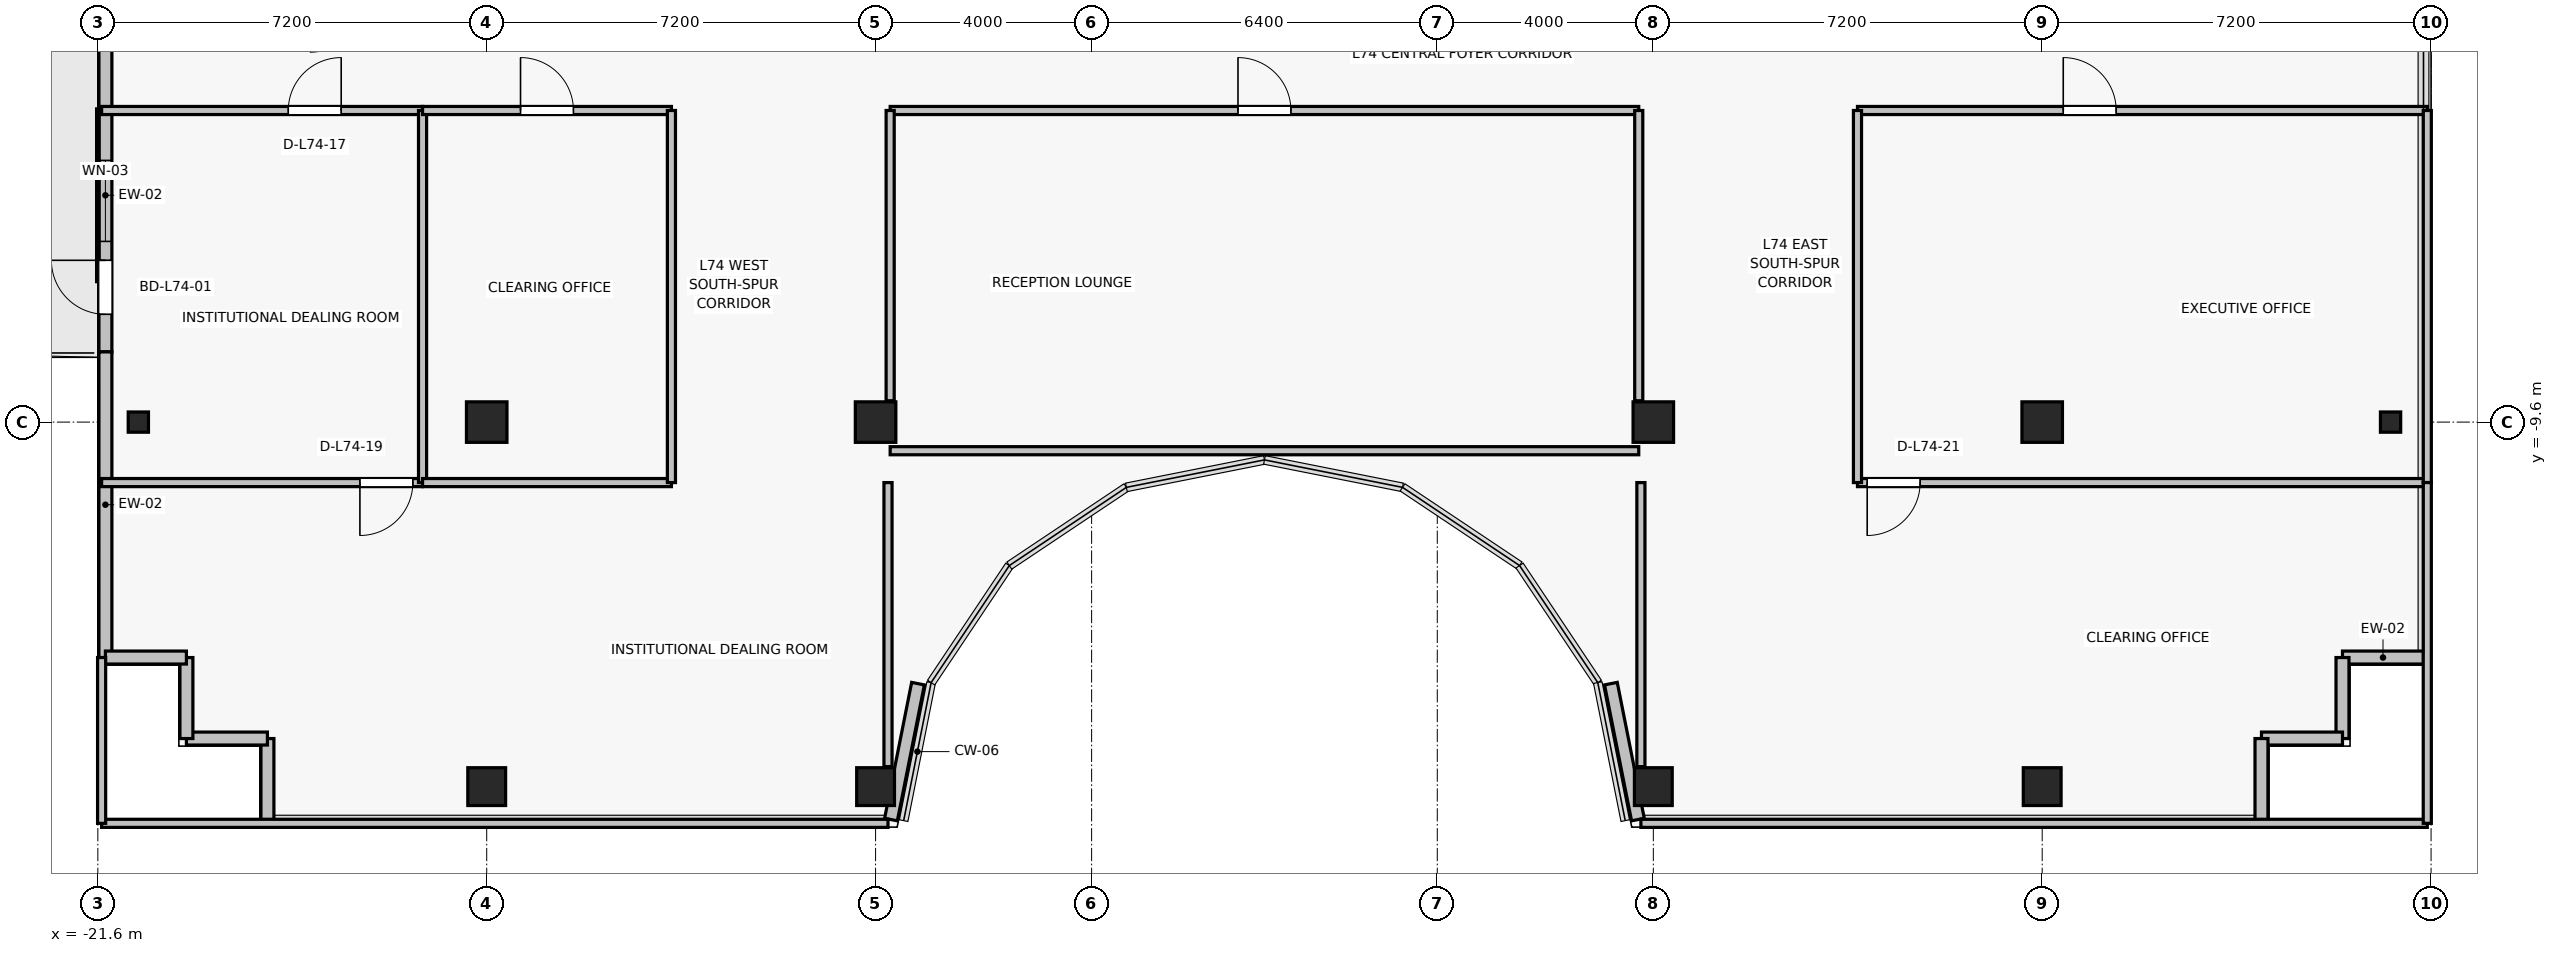
"""IFC4 building model, lengths in metres.
Left out: names, types, materials, properties, quantities, classifications, styles, units other than length and angle.
Written with IfcOpenShell. Run it as: python <this file> out.ifc"""

import sys

from ifc_helpers import new_model, si_unit, direction, frame, frame_2d, origin, origin_2d, place, context, subcontext, project, spatial, rectangle, i_section, extrude, source, transform, mapped, element, fill, save


model = new_model("IFC4")
c1 = context("Model", 3, precision=1e-05, world=origin(), true_north=direction((0.0, 1.0)))
c2 = subcontext(c1, "Body", "Model", "MODEL_VIEW")
j1 = project(units=[si_unit("LENGTHUNIT", "METRE"), si_unit("PLANEANGLEUNIT", "RADIAN")], contexts=[c1])
p1 = place(None, origin())
s1 = spatial("IfcSite", under=j1, at=p1, CompositionType="ELEMENT")
p2 = place(p1, origin())
s2 = spatial("IfcBuilding", under=s1, at=p2, CompositionType="ELEMENT")
p3 = place(p2, frame((0.0, 0.0, 261.7)))
s3 = spatial("IfcBuildingStorey", under=s2, at=p3, CompositionType="ELEMENT", Elevation=261.7)
for number, where, z_axis, x_axis in (
    (1, (-14.4, -9.6, 0.0), (0.0, 0.0, 1.0), (1.0, 0.0, 0.0)),
    (2, (-7.2, -9.6, 0.0), (0.0, 0.0, 1.0), (1.0, 0.0, 0.0)),
    (3, (7.2, -9.6, 0.0), (0.0, 0.0, 1.0), (1.0, 0.0, 0.0)),
    (4, (14.4, -9.6, 0.0), (0.0, 0.0, 1.0), (1.0, 0.0, 0.0)),
):
    element("IfcColumn", number, at=place(p3, frame(where, z_axis=z_axis, x_axis=x_axis)), inside=s3, PredefinedType="COLUMN", context=c2, shape_type="SweptSolid", body=[
        extrude(rectangle(XDim=0.75, YDim=0.75, at=origin_2d()), origin(), (0.0, 0.0, 1.0), 3.3),
    ])
for number, where, z_axis, x_axis in (
    (5, (-14.4, -16.35, 0.0), (0.0, 0.0, 1.0), (1.0, 0.0, 0.0)),
    (6, (-7.2, -16.35, 0.0), (0.0, 0.0, 1.0), (1.0, 0.0, 0.0)),
    (7, (7.2, -16.35, 0.0), (0.0, 0.0, 1.0), (1.0, 0.0, 0.0)),
    (8, (14.4, -16.35, 0.0), (0.0, 0.0, 1.0), (1.0, 0.0, 0.0)),
):
    element("IfcColumn", number, at=place(p3, frame(where, z_axis=z_axis, x_axis=x_axis)), inside=s3, PredefinedType="COLUMN", context=c2, shape_type="SweptSolid", body=[
        extrude(rectangle(XDim=0.7, YDim=0.7, at=origin_2d()), origin(), (0.0, 0.0, 1.0), 3.3),
    ])
for number, where, z_axis, x_axis in (
    (9, (-20.85, -9.6, 0.0), (0.0, 0.0, 1.0), (1.0, 0.0, 0.0)),
    (10, (20.85, -9.6, 0.0), (0.0, 0.0, 1.0), (1.0, 0.0, 0.0)),
):
    element("IfcColumn", number, at=place(p3, frame(where, z_axis=z_axis, x_axis=x_axis)), inside=s3, PredefinedType="COLUMN", context=c2, shape_type="SweptSolid", body=[
        extrude(i_section(OverallWidth=0.375, OverallDepth=0.375, WebThickness=0.017, FlangeThickness=0.027, FilletRadius=0.015, at=origin_2d()), origin(), (0.0, 0.0, 1.0), 3.3),
    ])
p4 = place(p3, frame((-21.46, -8.3, 0.0), z_axis=(0.0, 0.0, 1.0), x_axis=(0.0, 1.0, 0.0)))
e11 = element("IfcWall", 11, at=p4, inside=s3, PredefinedType="SOLIDWALL", context=c2, shape_type="SweptSolid", body=[
    extrude(rectangle(XDim=5.8, YDim=0.24, at=frame_2d((2.9, 0.0))), origin(), (0.0, 0.0, 1.0), 3.075),
])
p5 = place(p4, frame((0.696, 0.0, 0.0)))
e12 = element("IfcOpeningElement", 12, at=p5, cuts=e11, PredefinedType="OPENING", context=c2, shape_type="SweptSolid", body=[
    extrude(rectangle(XDim=1.0, YDim=2.2, at=frame_2d((0.5, 1.1))), frame((0.0, 0.13, 0.0), z_axis=(0.0, -1.0, 0.0), x_axis=(1.0, 0.0, 0.0)), (0.0, 0.0, 1.0), 0.26),
])
p6 = place(p4, frame((2.046, 0.0, 0.85)))
e13 = element("IfcOpeningElement", 13, at=p6, cuts=e11, PredefinedType="OPENING", context=c2, shape_type="SweptSolid", body=[
    extrude(rectangle(XDim=1.5, YDim=1.6, at=frame_2d((0.75, 0.8))), frame((0.0, 0.13, 0.0), z_axis=(0.0, -1.0, 0.0), x_axis=(1.0, 0.0, 0.0)), (0.0, 0.0, 1.0), 0.26),
])
p7 = place(p3, frame((-21.46, -8.3, 0.0), z_axis=(0.0, 0.0, 1.0), x_axis=(0.0, -1.0, 0.0)))
e14 = element("IfcWall", 14, at=p7, inside=s3, PredefinedType="SOLIDWALL", context=c2, shape_type="SweptSolid", body=[
    extrude(rectangle(XDim=5.66, YDim=0.24, at=frame_2d((2.83, 0.0))), origin(), (0.0, 0.0, 1.0), 3.075),
])
for number, where, z_axis, x_axis in (
    (15, (19.96, -13.96, 0.0), (0.0, 0.0, 1.0), (1.0, 0.0, 0.0)),
    (16, (19.96, -15.46, 0.0), (0.0, 0.0, 1.0), (0.0, 1.0, 0.0)),
    (17, (18.46, -15.46, 0.0), (0.0, 0.0, 1.0), (1.0, 0.0, 0.0)),
    (18, (18.46, -16.96, 0.0), (0.0, 0.0, 1.0), (0.0, 1.0, 0.0)),
):
    element("IfcWall", number, at=place(p3, frame(where, z_axis=z_axis, x_axis=x_axis)), inside=s3, PredefinedType="SOLIDWALL", context=c2, shape_type="SweptSolid", body=[
        extrude(rectangle(XDim=1.5, YDim=0.24, at=frame_2d((0.75, 0.0))), origin(), (0.0, 0.0, 1.0), 3.075),
    ])
for number, where, z_axis, x_axis in (
    (19, (6.414, -14.443, 0.0), (0.0, 0.0, 1.0), (0.195, -0.981, 0.0)),
    (20, (-6.915, -16.96, 0.0), (0.0, 0.0, 1.0), (0.195, 0.981, 0.0)),
):
    element("IfcWall", number, at=place(p3, frame(where, z_axis=z_axis, x_axis=x_axis)), inside=s3, PredefinedType="SOLIDWALL", context=c2, shape_type="SweptSolid", body=[
        extrude(rectangle(XDim=2.566, YDim=0.24, at=frame_2d((1.283, 0.0))), origin(), (0.0, 0.0, 1.0), 3.075),
    ])
for number, where, z_axis, x_axis in (
    (21, (-18.46, -15.46, 0.0), (0.0, 0.0, 1.0), (0.0, -1.0, 0.0)),
    (22, (-19.96, -15.46, 0.0), (0.0, 0.0, 1.0), (1.0, 0.0, 0.0)),
    (23, (-19.96, -13.96, 0.0), (0.0, 0.0, 1.0), (0.0, -1.0, 0.0)),
    (24, (-21.46, -13.96, 0.0), (0.0, 0.0, 1.0), (1.0, 0.0, 0.0)),
):
    element("IfcWall", number, at=place(p3, frame(where, z_axis=z_axis, x_axis=x_axis)), inside=s3, PredefinedType="SOLIDWALL", context=c2, shape_type="SweptSolid", body=[
        extrude(rectangle(XDim=1.5, YDim=0.24, at=frame_2d((0.75, 0.0))), origin(), (0.0, 0.0, 1.0), 3.075),
    ])
p8 = place(p3, frame((-15.588, -10.72, 0.0), z_axis=(0.0, 0.0, 1.0), x_axis=(-1.0, 0.0, 0.0)))
e25 = element("IfcWall", 25, at=p8, inside=s3, PredefinedType="PARTITIONING", context=c2, shape_type="SweptSolid", body=[
    extrude(rectangle(XDim=5.942, YDim=0.15, at=frame_2d((2.971, 0.0))), origin(), (0.0, 0.0, 1.0), 3.075),
])
p9 = place(p8, frame((0.18, 0.0, 0.0)))
e26 = element("IfcOpeningElement", 26, at=p9, cuts=e25, PredefinedType="OPENING", context=c2, shape_type="SweptSolid", body=[
    extrude(rectangle(XDim=0.98, YDim=2.15, at=frame_2d((0.49, 1.075))), frame((0.0, 0.085, 0.0), z_axis=(0.0, -1.0, 0.0), x_axis=(1.0, 0.0, 0.0)), (0.0, 0.0, 1.0), 0.17),
])
p10 = place(p3, frame((-21.53, -3.83, 0.0), z_axis=(0.0, 0.0, 1.0), x_axis=(1.0, 0.0, 0.0)))
e27 = element("IfcWall", 27, at=p10, inside=s3, PredefinedType="PARTITIONING", context=c2, shape_type="SweptSolid", body=[
    extrude(rectangle(XDim=5.942, YDim=0.15, at=frame_2d((2.971, 0.0))), origin(), (0.0, 0.0, 1.0), 2.765),
])
p11 = place(p10, frame((3.456, 0.0, 0.0)))
e28 = element("IfcOpeningElement", 28, at=p11, cuts=e27, PredefinedType="OPENING", context=c2, shape_type="SweptSolid", body=[
    extrude(rectangle(XDim=0.98, YDim=2.15, at=frame_2d((0.49, 1.075))), frame((0.0, 0.085, 0.0), z_axis=(0.0, -1.0, 0.0), x_axis=(1.0, 0.0, 0.0)), (0.0, 0.0, 1.0), 0.17),
])
p12 = place(p3, frame((-15.588, -3.83, 0.0), z_axis=(0.0, 0.0, 1.0), x_axis=(0.0, -1.0, 0.0)))
e29 = element("IfcWall", 29, at=p12, inside=s3, PredefinedType="PARTITIONING", context=c2, shape_type="SweptSolid", body=[
    extrude(rectangle(XDim=6.89, YDim=0.15, at=frame_2d((3.445, 0.0))), origin(), (0.0, 0.0, 1.0), 2.615),
])
p13 = place(p3, frame((-10.98, -10.72, 0.0), z_axis=(0.0, 0.0, 1.0), x_axis=(-1.0, 0.0, 0.0)))
e30 = element("IfcWall", 30, at=p13, inside=s3, PredefinedType="PARTITIONING", context=c2, shape_type="SweptSolid", body=[
    extrude(rectangle(XDim=4.608, YDim=0.15, at=frame_2d((2.304, 0.0))), origin(), (0.0, 0.0, 1.0), 2.615),
])
p14 = place(p3, frame((-15.588, -3.83, 0.0), z_axis=(0.0, 0.0, 1.0), x_axis=(1.0, 0.0, 0.0)))
e31 = element("IfcWall", 31, at=p14, inside=s3, PredefinedType="PARTITIONING", context=c2, shape_type="SweptSolid", body=[
    extrude(rectangle(XDim=4.608, YDim=0.15, at=frame_2d((2.304, 0.0))), origin(), (0.0, 0.0, 1.0), 2.615),
])
p15 = place(p14, frame((1.814, 0.0, 0.0)))
e32 = element("IfcOpeningElement", 32, at=p15, cuts=e31, PredefinedType="OPENING", context=c2, shape_type="SweptSolid", body=[
    extrude(rectangle(XDim=0.98, YDim=2.15, at=frame_2d((0.49, 1.075))), frame((0.0, 0.085, 0.0), z_axis=(0.0, -1.0, 0.0), x_axis=(1.0, 0.0, 0.0)), (0.0, 0.0, 1.0), 0.17),
])
p16 = place(p3, frame((-10.98, -3.83, 0.0), z_axis=(0.0, 0.0, 1.0), x_axis=(0.0, -1.0, 0.0)))
e33 = element("IfcWall", 33, at=p16, inside=s3, PredefinedType="PARTITIONING", context=c2, shape_type="SweptSolid", body=[
    extrude(rectangle(XDim=6.89, YDim=0.15, at=frame_2d((3.445, 0.0))), origin(), (0.0, 0.0, 1.0), 2.615),
])
p17 = place(p3, frame((-6.97, -17.03, 0.0), z_axis=(0.0, 0.0, 1.0), x_axis=(-1.0, 0.0, 0.0)))
e34 = element("IfcWall", 34, at=p17, inside=s3, PredefinedType="PARTITIONING", context=c2, shape_type="SweptSolid", body=[
    extrude(rectangle(XDim=14.56, YDim=0.15, at=frame_2d((7.28, 0.0))), origin(), (0.0, 0.0, 1.0), 3.075),
])
p18 = place(p3, frame((-21.53, -17.03, 0.0), z_axis=(0.0, 0.0, 1.0), x_axis=(0.0, 1.0, 0.0)))
e35 = element("IfcWall", 35, at=p18, inside=s3, PredefinedType="PARTITIONING", context=c2, shape_type="SweptSolid", body=[
    extrude(rectangle(XDim=3.07, YDim=0.15, at=frame_2d((1.535, 0.0))), origin(), (0.0, 0.0, 1.0), 3.075),
])
p19 = place(p3, frame((-6.97, -10.72, 0.0), z_axis=(0.0, 0.0, 1.0), x_axis=(0.0, -1.0, 0.0)))
e36 = element("IfcWall", 36, at=p19, inside=s3, PredefinedType="PARTITIONING", context=c2, shape_type="SweptSolid", body=[
    extrude(rectangle(XDim=5.26, YDim=0.15, at=frame_2d((2.63, 0.0))), origin(), (0.0, 0.0, 1.0), 2.615),
])
p20 = place(p3, frame((21.53, -10.72, 0.0), z_axis=(0.0, 0.0, 1.0), x_axis=(-1.0, 0.0, 0.0)))
e37 = element("IfcWall", 37, at=p20, inside=s3, PredefinedType="PARTITIONING", context=c2, shape_type="SweptSolid", body=[
    extrude(rectangle(XDim=10.55, YDim=0.15, at=frame_2d((5.275, 0.0))), origin(), (0.0, 0.0, 1.0), 2.615),
])
p21 = place(p20, frame((9.39, 0.0, 0.0)))
e38 = element("IfcOpeningElement", 38, at=p21, cuts=e37, PredefinedType="OPENING", context=c2, shape_type="SweptSolid", body=[
    extrude(rectangle(XDim=0.98, YDim=2.15, at=frame_2d((0.49, 1.075))), frame((0.0, 0.085, 0.0), z_axis=(0.0, -1.0, 0.0), x_axis=(1.0, 0.0, 0.0)), (0.0, 0.0, 1.0), 0.17),
])
p22 = place(p3, frame((10.98, -3.83, 0.0), z_axis=(0.0, 0.0, 1.0), x_axis=(1.0, 0.0, 0.0)))
e39 = element("IfcWall", 39, at=p22, inside=s3, PredefinedType="PARTITIONING", context=c2, shape_type="SweptSolid", body=[
    extrude(rectangle(XDim=10.55, YDim=0.15, at=frame_2d((5.275, 0.0))), origin(), (0.0, 0.0, 1.0), 2.615),
])
p23 = place(p22, frame((3.81, 0.0, 0.0)))
e40 = element("IfcOpeningElement", 40, at=p23, cuts=e39, PredefinedType="OPENING", context=c2, shape_type="SweptSolid", body=[
    extrude(rectangle(XDim=0.98, YDim=2.15, at=frame_2d((0.49, 1.075))), frame((0.0, 0.085, 0.0), z_axis=(0.0, -1.0, 0.0), x_axis=(1.0, 0.0, 0.0)), (0.0, 0.0, 1.0), 0.17),
])
p24 = place(p3, frame((10.98, -10.72, 0.0), z_axis=(0.0, 0.0, 1.0), x_axis=(0.0, 1.0, 0.0)))
e41 = element("IfcWall", 41, at=p24, inside=s3, PredefinedType="PARTITIONING", context=c2, shape_type="SweptSolid", body=[
    extrude(rectangle(XDim=6.89, YDim=0.15, at=frame_2d((3.445, 0.0))), origin(), (0.0, 0.0, 1.0), 2.615),
])
p25 = place(p3, frame((21.53, -3.83, 0.0), z_axis=(0.0, 0.0, 1.0), x_axis=(0.0, -1.0, 0.0)))
e42 = element("IfcWall", 42, at=p25, inside=s3, PredefinedType="PARTITIONING", context=c2, shape_type="SweptSolid", body=[
    extrude(rectangle(XDim=6.89, YDim=0.15, at=frame_2d((3.445, 0.0))), origin(), (0.0, 0.0, 1.0), 2.665),
])
p26 = place(p3, frame((21.53, -17.03, 0.0), z_axis=(0.0, 0.0, 1.0), x_axis=(-1.0, 0.0, 0.0)))
e43 = element("IfcWall", 43, at=p26, inside=s3, PredefinedType="PARTITIONING", context=c2, shape_type="SweptSolid", body=[
    extrude(rectangle(XDim=14.56, YDim=0.15, at=frame_2d((7.28, 0.0))), origin(), (0.0, 0.0, 1.0), 3.075),
])
p27 = place(p3, frame((6.97, -15.98, 0.0), z_axis=(0.0, 0.0, 1.0), x_axis=(0.0, 1.0, 0.0)))
e44 = element("IfcWall", 44, at=p27, inside=s3, PredefinedType="PARTITIONING", context=c2, shape_type="SweptSolid", body=[
    extrude(rectangle(XDim=5.26, YDim=0.15, at=frame_2d((2.63, 0.0))), origin(), (0.0, 0.0, 1.0), 2.615),
])
p28 = place(p3, frame((21.53, -10.72, 0.0), z_axis=(0.0, 0.0, 1.0), x_axis=(0.0, -1.0, 0.0)))
e45 = element("IfcWall", 45, at=p28, inside=s3, PredefinedType="PARTITIONING", context=c2, shape_type="SweptSolid", body=[
    extrude(rectangle(XDim=6.31, YDim=0.15, at=frame_2d((3.155, 0.0))), origin(), (0.0, 0.0, 1.0), 3.075),
])
p29 = place(p3, frame((6.93, -10.13, 0.0), z_axis=(0.0, 0.0, 1.0), x_axis=(-1.0, 0.0, 0.0)))
e46 = element("IfcWall", 46, at=p29, inside=s3, PredefinedType="PARTITIONING", context=c2, shape_type="SweptSolid", body=[
    extrude(rectangle(XDim=13.86, YDim=0.15, at=frame_2d((6.93, 0.0))), origin(), (0.0, 0.0, 1.0), 2.615),
])
p30 = place(p3, frame((-6.93, -3.83, 0.0), z_axis=(0.0, 0.0, 1.0), x_axis=(1.0, 0.0, 0.0)))
e47 = element("IfcWall", 47, at=p30, inside=s3, PredefinedType="PARTITIONING", context=c2, shape_type="SweptSolid", body=[
    extrude(rectangle(XDim=13.86, YDim=0.15, at=frame_2d((6.93, 0.0))), origin(), (0.0, 0.0, 1.0), 2.615),
])
p31 = place(p30, frame((6.44, 0.0, 0.0)))
e48 = element("IfcOpeningElement", 48, at=p31, cuts=e47, PredefinedType="OPENING", context=c2, shape_type="SweptSolid", body=[
    extrude(rectangle(XDim=0.98, YDim=2.15, at=frame_2d((0.49, 1.075))), frame((0.0, 0.085, 0.0), z_axis=(0.0, -1.0, 0.0), x_axis=(1.0, 0.0, 0.0)), (0.0, 0.0, 1.0), 0.17),
])
for number, where, z_axis, x_axis in (
    (49, (-6.93, -9.205, 0.0), (0.0, 0.0, 1.0), (0.0, 1.0, 0.0)),
    (50, (6.93, -3.83, 0.0), (0.0, 0.0, 1.0), (0.0, -1.0, 0.0)),
):
    element("IfcWall", number, at=place(p3, frame(where, z_axis=z_axis, x_axis=x_axis)), inside=s3, PredefinedType="PARTITIONING", context=c2, shape_type="SweptSolid", body=[
        extrude(rectangle(XDim=5.375, YDim=0.15, at=frame_2d((2.688, 0.0))), origin(), (0.0, 0.0, 1.0), 2.615),
    ])
m1 = source(origin(), c2, "Body", "SweptSolid", [
    extrude(rectangle(XDim=1.0, YDim=2.2, at=frame_2d((0.5, 1.1))), frame((0.0, 0.025, 0.0), z_axis=(0.0, -1.0, 0.0), x_axis=(1.0, 0.0, 0.0)), (0.0, 0.0, 1.0), 0.05),
])
p32 = place(p5, origin())
e51 = element("IfcDoor", 51, at=p32, inside=s3, OperationType="SINGLE_SWING_RIGHT", PredefinedType="DOOR", context=c2, shape_type="MappedRepresentation", body=[
    mapped(m1, transform((0.0, 0.0, 0.0), x_axis=(1.0, 0.0, 0.0), y_axis=(0.0, 1.0, 0.0), z_axis=(0.0, 0.0, 1.0), scale=1.0)),
])
fill(e12, e51)
m2 = source(origin(), c2, "Body", "SweptSolid", [
    extrude(rectangle(XDim=1.5, YDim=1.6, at=frame_2d((0.75, 0.8))), frame((0.0, 0.03, 0.0), z_axis=(0.0, -1.0, 0.0), x_axis=(1.0, 0.0, 0.0)), (0.0, 0.0, 1.0), 0.06),
])
p33 = place(p6, origin())
e52 = element("IfcWindow", 52, at=p33, inside=s3, PartitioningType="SINGLE_PANEL", PredefinedType="WINDOW", context=c2, shape_type="MappedRepresentation", body=[
    mapped(m2, transform((0.0, 0.0, 0.0), x_axis=(1.0, 0.0, 0.0), y_axis=(0.0, 1.0, 0.0), z_axis=(0.0, 0.0, 1.0), scale=1.0)),
])
fill(e13, e52)
m3 = source(origin(), c2, "Body", "SweptSolid", [
    extrude(rectangle(XDim=0.98, YDim=2.15, at=frame_2d((0.49, 1.075))), frame((0.0, 0.025, 0.0), z_axis=(0.0, -1.0, 0.0), x_axis=(1.0, 0.0, 0.0)), (0.0, 0.0, 1.0), 0.05),
])
p34 = place(p11, origin())
e53 = element("IfcDoor", 53, at=p34, inside=s3, OperationType="SINGLE_SWING_RIGHT", PredefinedType="DOOR", context=c2, shape_type="MappedRepresentation", body=[
    mapped(m3, transform((0.0, 0.0, 0.0), x_axis=(1.0, 0.0, 0.0), y_axis=(0.0, 1.0, 0.0), z_axis=(0.0, 0.0, 1.0), scale=1.0)),
])
fill(e28, e53)
p35 = place(p15, origin())
e54 = element("IfcDoor", 54, at=p35, inside=s3, OperationType="SINGLE_SWING_LEFT", PredefinedType="DOOR", context=c2, shape_type="MappedRepresentation", body=[
    mapped(m3, transform((0.0, 0.0, 0.0), x_axis=(1.0, 0.0, 0.0), y_axis=(0.0, 1.0, 0.0), z_axis=(0.0, 0.0, 1.0), scale=1.0)),
])
fill(e32, e54)
p36 = place(p9, origin())
e55 = element("IfcDoor", 55, at=p36, inside=s3, OperationType="SINGLE_SWING_RIGHT", PredefinedType="DOOR", context=c2, shape_type="MappedRepresentation", body=[
    mapped(m3, transform((0.0, 0.0, 0.0), x_axis=(1.0, 0.0, 0.0), y_axis=(0.0, 1.0, 0.0), z_axis=(0.0, 0.0, 1.0), scale=1.0)),
])
fill(e26, e55)
p37 = place(p23, origin())
e56 = element("IfcDoor", 56, at=p37, inside=s3, OperationType="SINGLE_SWING_LEFT", PredefinedType="DOOR", context=c2, shape_type="MappedRepresentation", body=[
    mapped(m3, transform((0.0, 0.0, 0.0), x_axis=(1.0, 0.0, 0.0), y_axis=(0.0, 1.0, 0.0), z_axis=(0.0, 0.0, 1.0), scale=1.0)),
])
fill(e40, e56)
p38 = place(p21, origin())
e57 = element("IfcDoor", 57, at=p38, inside=s3, OperationType="SINGLE_SWING_RIGHT", PredefinedType="DOOR", context=c2, shape_type="MappedRepresentation", body=[
    mapped(m3, transform((0.0, 0.0, 0.0), x_axis=(1.0, 0.0, 0.0), y_axis=(0.0, 1.0, 0.0), z_axis=(0.0, 0.0, 1.0), scale=1.0)),
])
fill(e38, e57)
p39 = place(p31, origin())
e58 = element("IfcDoor", 58, at=p39, inside=s3, OperationType="SINGLE_SWING_LEFT", PredefinedType="DOOR", context=c2, shape_type="MappedRepresentation", body=[
    mapped(m3, transform((0.0, 0.0, 0.0), x_axis=(1.0, 0.0, 0.0), y_axis=(0.0, 1.0, 0.0), z_axis=(0.0, 0.0, 1.0), scale=1.0)),
])
fill(e48, e58)
save(model, sys.argv[1])
